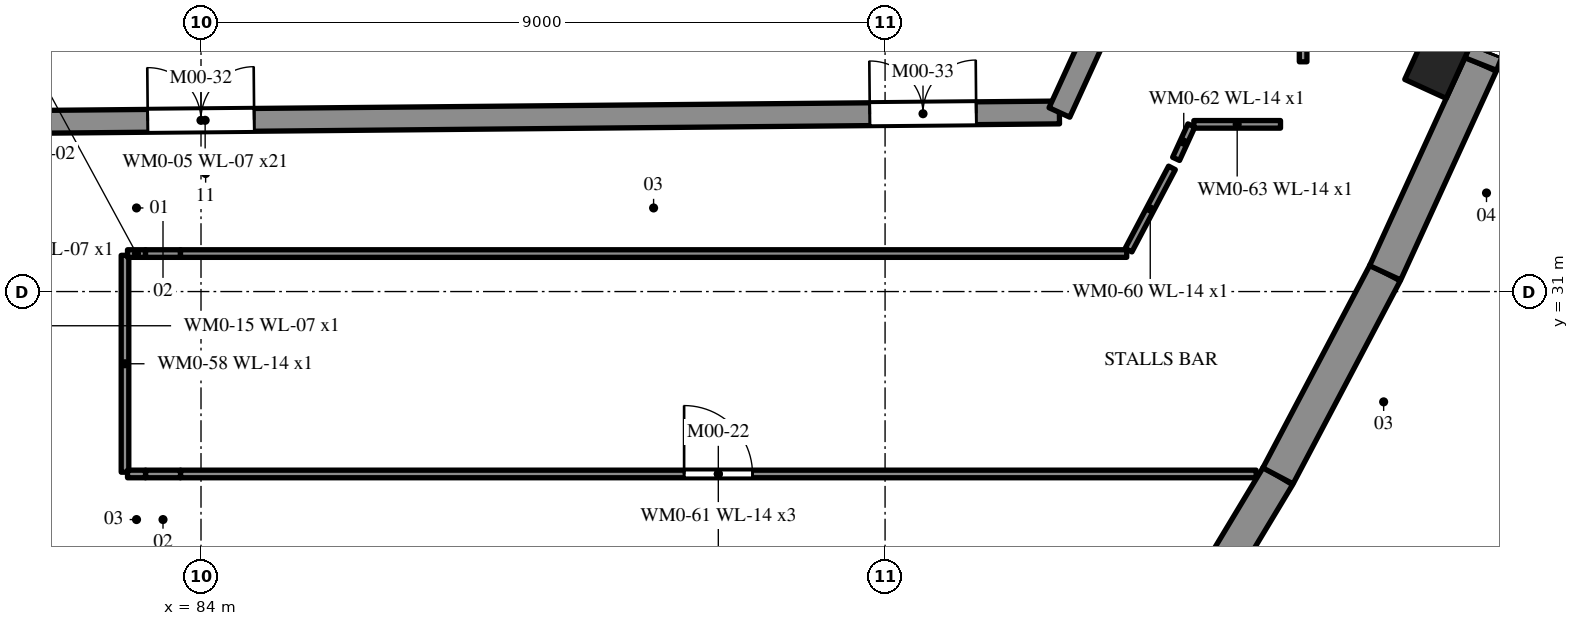
"""IFC4 building model, lengths in metres.
Left out: names, types, materials, properties, quantities, classifications, styles, units other than length and angle.
Written with IfcOpenShell. Run it as: python <this file> out.ifc"""

import sys

from ifc_helpers import new_model, si_unit, direction, frame, frame_2d, origin, origin_2d, place, context, subcontext, project, spatial, rectangle, extrude, element, fill, save


model = new_model("IFC4")
c1 = context("Model", 3, precision=1e-05, world=origin(), true_north=direction((0.0, 1.0)))
c2 = subcontext(c1, "Body", "Model", "MODEL_VIEW")
j1 = project(units=[si_unit("LENGTHUNIT", "METRE"), si_unit("PLANEANGLEUNIT", "RADIAN")], contexts=[c1])
p1 = place(None, origin())
s1 = spatial("IfcSite", under=j1, at=p1, CompositionType="ELEMENT")
p2 = place(p1, origin())
s2 = spatial("IfcBuilding", under=s1, at=p2, CompositionType="ELEMENT")
p3 = place(p2, origin())
s3 = spatial("IfcBuildingStorey", under=s2, at=p3, CompositionType="ELEMENT", Elevation=0.0)
p4 = place(p3, frame((96.611, 25.986, 0.0), z_axis=(0.0, 0.0, 1.0), x_axis=(0.515636119523, 0.856807675177, 0.0)))
e1 = element("IfcWall", 1, at=p4, inside=s3, PredefinedType="SOLIDWALL", context=c2, shape_type="SweptSolid", body=[
    extrude(rectangle(XDim=3.021, YDim=0.45, at=frame_2d((1.511, 0.0))), origin(), (0.0, 0.0, 1.0), 5.4),
])
p5 = place(p3, frame((98.169, 28.575, 0.0), z_axis=(0.0, 0.0, 1.0), x_axis=(0.466728769487, 0.884400506407, 0.0)))
e2 = element("IfcWall", 2, at=p5, inside=s3, PredefinedType="SOLIDWALL", context=c2, shape_type="SweptSolid", body=[
    extrude(rectangle(XDim=3.021, YDim=0.45, at=frame_2d((1.51, 0.0))), origin(), (0.0, 0.0, 1.0), 5.4),
])
p6 = place(p3, frame((99.579, 31.246, 0.0), z_axis=(0.0, 0.0, 1.0), x_axis=(0.416407051835, 0.909178292296, 0.0)))
e3 = element("IfcWall", 3, at=p6, inside=s3, PredefinedType="SOLIDWALL", context=c2, shape_type="SweptSolid", body=[
    extrude(rectangle(XDim=3.021, YDim=0.45, at=frame_2d((1.511, 0.0))), origin(), (0.0, 0.0, 1.0), 5.4),
])
p7 = place(p3, frame((100.837, 33.993, 0.0), z_axis=(0.0, 0.0, 1.0), x_axis=(0.366920100653, 0.930252460215, 0.0)))
e4 = element("IfcWall", 4, at=p7, inside=s3, PredefinedType="SOLIDWALL", context=c2, shape_type="SweptSolid", body=[
    extrude(rectangle(XDim=2.752, YDim=0.45, at=frame_2d((1.376, 0.0))), origin(), (0.0, 0.0, 1.0), 5.4),
])
p8 = place(p7, frame((0.176, 0.0, 0.0)))
e5 = element("IfcOpeningElement", 5, at=p8, cuts=e4, PredefinedType="OPENING", context=c2, shape_type="SweptSolid", body=[
    extrude(rectangle(XDim=2.4, YDim=2.4, at=frame_2d((1.2, 1.2))), frame((0.0, 0.235, 0.0), z_axis=(0.0, -1.0, 0.0), x_axis=(1.0, 0.0, 0.0)), (0.0, 0.0, 1.0), 0.47),
])
p9 = place(p3, frame((72.815, 33.15, 0.0), z_axis=(0.0, 0.0, 1.0), x_axis=(0.999957788763, 0.009188073348, 0.0)))
e6 = element("IfcWall", 6, at=p9, inside=s3, PredefinedType="SHEAR", context=c2, shape_type="SweptSolid", body=[
    extrude(rectangle(XDim=22.479, YDim=0.3, at=frame_2d((11.24, 0.0))), origin(), (0.0, 0.0, 1.0), 5.4),
])
p10 = place(p9, frame((0.985, 0.0, 0.0)))
e7 = element("IfcOpeningElement", 7, at=p10, cuts=e6, PredefinedType="OPENING", context=c2, shape_type="SweptSolid", body=[
    extrude(rectangle(XDim=1.4, YDim=2.1, at=frame_2d((0.7, 1.05))), frame((0.0, 0.16, 0.0), z_axis=(0.0, -1.0, 0.0), x_axis=(1.0, 0.0, 0.0)), (0.0, 0.0, 1.0), 0.32),
])
p11 = place(p9, frame((10.485, 0.0, 0.0)))
e8 = element("IfcOpeningElement", 8, at=p11, cuts=e6, PredefinedType="OPENING", context=c2, shape_type="SweptSolid", body=[
    extrude(rectangle(XDim=1.4, YDim=2.1, at=frame_2d((0.7, 1.05))), frame((0.0, 0.16, 0.0), z_axis=(0.0, -1.0, 0.0), x_axis=(1.0, 0.0, 0.0)), (0.0, 0.0, 1.0), 0.32),
])
p12 = place(p9, frame((19.985, 0.0, 0.0)))
e9 = element("IfcOpeningElement", 9, at=p12, cuts=e6, PredefinedType="OPENING", context=c2, shape_type="SweptSolid", body=[
    extrude(rectangle(XDim=1.4, YDim=2.1, at=frame_2d((0.7, 1.05))), frame((0.0, 0.16, 0.0), z_axis=(0.0, -1.0, 0.0), x_axis=(1.0, 0.0, 0.0)), (0.0, 0.0, 1.0), 0.32),
])
p13 = place(p3, frame((95.294, 33.356, 0.0), z_axis=(0.0, 0.0, 1.0), x_axis=(0.416368255987, 0.909196059938, 0.0)))
e10 = element("IfcWall", 10, at=p13, inside=s3, PredefinedType="SHEAR", context=c2, shape_type="SweptSolid", body=[
    extrude(rectangle(XDim=2.759, YDim=0.3, at=frame_2d((1.379, 0.0))), origin(), (0.0, 0.0, 1.0), 5.4),
])
p14 = place(p3, frame((100.36, 34.212, 0.0), z_axis=(0.0, 0.0, 1.0), x_axis=(0.416344267901, 0.90920704495, 0.0)))
e11 = element("IfcColumn", 11, at=p14, inside=s3, PredefinedType="PILASTER", context=c2, shape_type="SweptSolid", body=[
    extrude(rectangle(XDim=1.2, YDim=0.6, at=origin_2d()), origin(), (0.0, 0.0, 1.0), 5.4),
])
p15 = place(p3, frame((83.0, 28.623, 0.0), z_axis=(0.0, 0.0, 1.0), x_axis=(0.0, 1.0, 0.0)))
e12 = element("IfcWall", 12, at=p15, inside=s3, PredefinedType="PARTITIONING", context=c2, shape_type="SweptSolid", body=[
    extrude(rectangle(XDim=2.854, YDim=0.1, at=frame_2d((1.427, 0.0))), origin(), (0.0, 0.0, 1.0), 5.15),
])
p16 = place(p3, frame((83.033, 31.5, 0.0), z_axis=(0.0, 0.0, 1.0), x_axis=(1.0, 0.0, 0.0)))
e13 = element("IfcWall", 13, at=p16, inside=s3, PredefinedType="PARTITIONING", context=c2, shape_type="SweptSolid", body=[
    extrude(rectangle(XDim=0.237, YDim=0.1, at=frame_2d((0.119, 0.0))), origin(), (0.0, 0.0, 1.0), 5.15),
])
p17 = place(p3, frame((83.27, 31.5, 0.0), z_axis=(0.0, 0.0, 1.0), x_axis=(1.0, 0.0, 0.0)))
e14 = element("IfcWall", 14, at=p17, inside=s3, PredefinedType="PARTITIONING", context=c2, shape_type="SweptSolid", body=[
    extrude(rectangle(XDim=0.46, YDim=0.1, at=frame_2d((0.23, 0.0))), origin(), (0.0, 0.0, 1.0), 4.32),
])
p18 = place(p3, frame((83.73, 31.5, 0.0), z_axis=(0.0, 0.0, 1.0), x_axis=(1.0, 0.0, 0.0)))
e15 = element("IfcWall", 15, at=p18, inside=s3, PredefinedType="PARTITIONING", context=c2, shape_type="SweptSolid", body=[
    extrude(rectangle(XDim=12.449, YDim=0.1, at=frame_2d((6.225, 0.0))), origin(), (0.0, 0.0, 1.0), 5.15),
])
p19 = place(p3, frame((96.203, 31.545, 0.0), z_axis=(0.0, 0.0, 1.0), x_axis=(0.466814963205, 0.884355013627, 0.0)))
e16 = element("IfcWall", 16, at=p19, inside=s3, PredefinedType="PARTITIONING", context=c2, shape_type="SweptSolid", body=[
    extrude(rectangle(XDim=1.224, YDim=0.1, at=frame_2d((0.612, 0.0))), origin(), (0.0, 0.0, 1.0), 5.15),
])
p20 = place(p3, frame((97.882, 28.6, 0.0), z_axis=(0.0, 0.0, 1.0), x_axis=(-1.0, 0.0, 0.0)))
e17 = element("IfcWall", 17, at=p20, inside=s3, PredefinedType="PARTITIONING", context=c2, shape_type="SweptSolid", body=[
    extrude(rectangle(XDim=14.152, YDim=0.1, at=frame_2d((7.076, 0.0))), origin(), (0.0, 0.0, 1.0), 5.15),
])
p21 = place(p20, frame((6.626, 0.0, 0.0)))
e18 = element("IfcOpeningElement", 18, at=p21, cuts=e17, PredefinedType="OPENING", context=c2, shape_type="SweptSolid", body=[
    extrude(rectangle(XDim=0.9, YDim=2.1, at=frame_2d((0.45, 1.05))), frame((0.0, 0.06, 0.0), z_axis=(0.0, -1.0, 0.0), x_axis=(1.0, 0.0, 0.0)), (0.0, 0.0, 1.0), 0.12),
])
p22 = place(p3, frame((83.73, 28.6, 0.0), z_axis=(0.0, 0.0, 1.0), x_axis=(-1.0, 0.0, 0.0)))
e19 = element("IfcWall", 19, at=p22, inside=s3, PredefinedType="PARTITIONING", context=c2, shape_type="SweptSolid", body=[
    extrude(rectangle(XDim=0.46, YDim=0.1, at=frame_2d((0.23, 0.0))), origin(), (0.0, 0.0, 1.0), 4.32),
])
p23 = place(p3, frame((83.27, 28.6, 0.0), z_axis=(0.0, 0.0, 1.0), x_axis=(-1.0, 0.0, 0.0)))
e20 = element("IfcWall", 20, at=p23, inside=s3, PredefinedType="PARTITIONING", context=c2, shape_type="SweptSolid", body=[
    extrude(rectangle(XDim=0.237, YDim=0.1, at=frame_2d((0.118, 0.0))), origin(), (0.0, 0.0, 1.0), 5.15),
])
p24 = place(p3, frame((96.829, 32.746, 0.0), z_axis=(0.0, 0.0, 1.0), x_axis=(0.416272443585, 0.909239931323, 0.0)))
e21 = element("IfcWall", 21, at=p24, inside=s3, PredefinedType="PARTITIONING", context=c2, shape_type="SweptSolid", body=[
    extrude(rectangle(XDim=0.484, YDim=0.1, at=frame_2d((0.242, 0.0))), origin(), (0.0, 0.0, 1.0), 5.15),
])
p25 = place(p3, frame((97.062, 33.2, 0.0), z_axis=(0.0, 0.0, 1.0), x_axis=(1.0, 0.0, 0.0)))
e22 = element("IfcWall", 22, at=p25, inside=s3, PredefinedType="PARTITIONING", context=c2, shape_type="SweptSolid", body=[
    extrude(rectangle(XDim=1.14, YDim=0.1, at=frame_2d((0.57, 0.0))), origin(), (0.0, 0.0, 1.0), 5.15),
])
p26 = place(p3, frame((98.5, 34.023, 0.0), z_axis=(0.0, 0.0, 1.0), x_axis=(0.0, 1.0, 0.0)))
e23 = element("IfcWall", 23, at=p26, inside=s3, PredefinedType="PARTITIONING", context=c2, shape_type="SweptSolid", body=[
    extrude(rectangle(XDim=0.797, YDim=0.1, at=frame_2d((0.398, 0.0))), origin(), (0.0, 0.0, 1.0), 5.15),
])
p27 = place(p8, frame((2.4, 0.0, 0.0), z_axis=(0.0, 0.0, 1.0), x_axis=(-1.0, 0.0, 0.0)))
e24 = element("IfcDoor", 24, at=p27, inside=s3, OperationType="DOUBLE_DOOR_SINGLE_SWING", PredefinedType="DOOR", context=c2, shape_type="SweptSolid", body=[
    extrude(rectangle(XDim=2.4, YDim=2.4, at=frame_2d((1.2, 1.2))), frame((0.0, 0.025, 0.0), z_axis=(0.0, -1.0, 0.0), x_axis=(1.0, 0.0, 0.0)), (0.0, 0.0, 1.0), 0.05),
])
fill(e5, e24)
p28 = place(p21, frame((0.9, 0.0, 0.0), z_axis=(0.0, 0.0, 1.0), x_axis=(-1.0, 0.0, 0.0)))
e25 = element("IfcDoor", 25, at=p28, inside=s3, OperationType="SINGLE_SWING_LEFT", PredefinedType="DOOR", context=c2, shape_type="SweptSolid", body=[
    extrude(rectangle(XDim=0.9, YDim=2.1, at=frame_2d((0.45, 1.05))), frame((0.0, 0.025, 0.0), z_axis=(0.0, -1.0, 0.0), x_axis=(1.0, 0.0, 0.0)), (0.0, 0.0, 1.0), 0.05),
])
fill(e18, e25)
p29 = place(p11, origin())
e26 = element("IfcDoor", 26, at=p29, inside=s3, OperationType="DOUBLE_DOOR_SINGLE_SWING", PredefinedType="DOOR", context=c2, shape_type="SweptSolid", body=[
    extrude(rectangle(XDim=1.4, YDim=2.1, at=frame_2d((0.7, 1.05))), frame((0.0, 0.025, 0.0), z_axis=(0.0, -1.0, 0.0), x_axis=(1.0, 0.0, 0.0)), (0.0, 0.0, 1.0), 0.05),
])
fill(e8, e26)
p30 = place(p12, origin())
e27 = element("IfcDoor", 27, at=p30, inside=s3, OperationType="DOUBLE_DOOR_SINGLE_SWING", PredefinedType="DOOR", context=c2, shape_type="SweptSolid", body=[
    extrude(rectangle(XDim=1.4, YDim=2.1, at=frame_2d((0.7, 1.05))), frame((0.0, 0.025, 0.0), z_axis=(0.0, -1.0, 0.0), x_axis=(1.0, 0.0, 0.0)), (0.0, 0.0, 1.0), 0.05),
])
fill(e9, e27)
save(model, sys.argv[1])
